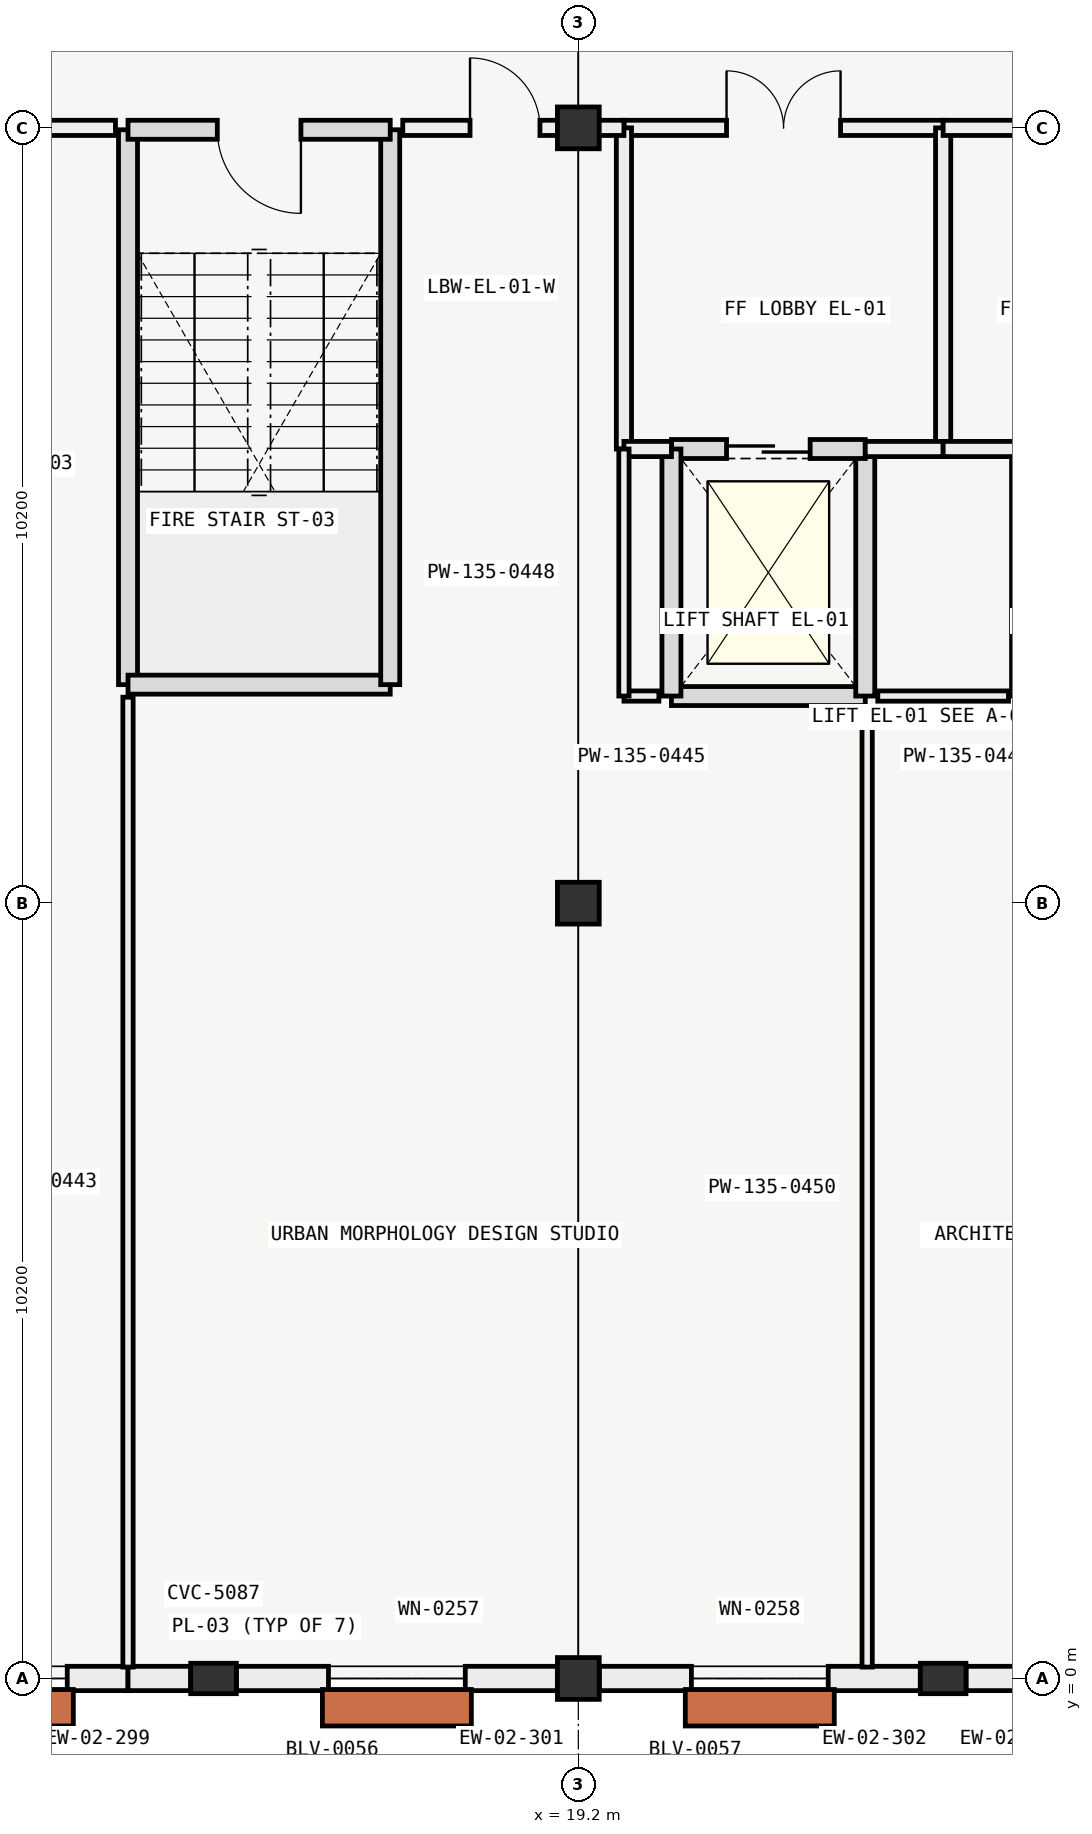
"""IFC4 building model, lengths in metres.
Left out: names, types, materials, properties, quantities, classifications, styles, units other than length and angle.
Written with IfcOpenShell. Run it as: python <this file> out.ifc"""

import sys

from ifc_helpers import new_model, si_unit, direction, frame, frame_2d, origin, origin_2d, place, context, subcontext, project, spatial, rectangle, extrude, element, fill, save


model = new_model("IFC4")
c1 = context("Model", 3, precision=1e-05, world=origin(), true_north=direction((0.0, 1.0)))
c2 = subcontext(c1, "Body", "Model", "MODEL_VIEW")
j1 = project(units=[si_unit("LENGTHUNIT", "METRE"), si_unit("PLANEANGLEUNIT", "RADIAN")], contexts=[c1])
p1 = place(None, origin())
s1 = spatial("IfcSite", under=j1, at=p1, CompositionType="ELEMENT")
p2 = place(p1, origin())
s2 = spatial("IfcBuilding", under=s1, at=p2, CompositionType="ELEMENT")
p3 = place(p2, frame((0.0, 0.0, 22.2)))
s3 = spatial("IfcBuildingStorey", under=s2, at=p3, CompositionType="ELEMENT", Elevation=22.2)
for number, where, z_axis, x_axis in (
    (1, (19.2, 0.0, 0.0), (0.0, 0.0, 1.0), (1.0, 0.0, 0.0)),
    (2, (19.2, 10.2, 0.0), (0.0, 0.0, 1.0), (1.0, 0.0, 0.0)),
    (3, (19.2, 20.4, 0.0), (0.0, 0.0, 1.0), (1.0, 0.0, 0.0)),
):
    element("IfcColumn", number, at=place(p3, frame(where, z_axis=z_axis, x_axis=x_axis)), inside=s3, PredefinedType="COLUMN", context=c2, shape_type="SweptSolid", body=[
        extrude(rectangle(XDim=0.55, YDim=0.55, at=origin_2d()), origin(), (0.0, 0.0, 1.0), 4.2),
    ])
for number, where, z_axis, x_axis in (
    (4, (14.4, 0.0, 0.0), (0.0, 0.0, 1.0), (0.0, 1.0, 0.0)),
    (5, (24.0, 0.0, 0.0), (0.0, 0.0, 1.0), (0.0, 1.0, 0.0)),
):
    element("IfcColumn", number, at=place(p3, frame(where, z_axis=z_axis, x_axis=x_axis)), inside=s3, PredefinedType="PILASTER", context=c2, shape_type="SweptSolid", body=[
        extrude(rectangle(XDim=0.4, YDim=0.6, at=origin_2d()), origin(), (0.0, 0.0, 1.0), 4.2),
    ])
p4 = place(p3, frame((13.275, 0.0, 0.0), z_axis=(0.0, 0.0, 1.0), x_axis=(-1.0, 0.0, 0.0)))
e6 = element("IfcWall", 6, at=p4, inside=s3, PredefinedType="SOLIDWALL", context=c2, shape_type="SweptSolid", body=[
    extrude(rectangle(XDim=3.399, YDim=0.32, at=frame_2d((1.699, 0.0))), origin(), (0.0, 0.0, 1.0), 3.3),
])
p5 = place(p4, frame((0.8, 0.0, 0.8)))
e7 = element("IfcOpeningElement", 7, at=p5, cuts=e6, PredefinedType="OPENING", context=c2, shape_type="SweptSolid", body=[
    extrude(rectangle(XDim=1.8, YDim=2.1, at=frame_2d((0.9, 1.05))), frame((0.0, 0.17, 0.0), z_axis=(0.0, -1.0, 0.0), x_axis=(1.0, 0.0, 0.0)), (0.0, 0.0, 1.0), 0.34),
])
p6 = place(p3, frame((14.099, 0.0, 0.0), z_axis=(0.0, 0.0, 1.0), x_axis=(-1.0, 0.0, 0.0)))
e8 = element("IfcWall", 8, at=p6, inside=s3, PredefinedType="SOLIDWALL", context=c2, shape_type="SweptSolid", body=[
    extrude(rectangle(XDim=0.824, YDim=0.32, at=frame_2d((0.412, 0.0))), origin(), (0.0, 0.0, 1.0), 3.3),
])
p7 = place(p3, frame((18.924, 0.0, 0.0), z_axis=(0.0, 0.0, 1.0), x_axis=(-1.0, 0.0, 0.0)))
e9 = element("IfcWall", 9, at=p7, inside=s3, PredefinedType="SOLIDWALL", context=c2, shape_type="SweptSolid", body=[
    extrude(rectangle(XDim=4.223, YDim=0.32, at=frame_2d((2.112, 0.0))), origin(), (0.0, 0.0, 1.0), 3.3),
])
p8 = place(p7, frame((1.211, 0.0, 0.8)))
e10 = element("IfcOpeningElement", 10, at=p8, cuts=e9, PredefinedType="OPENING", context=c2, shape_type="SweptSolid", body=[
    extrude(rectangle(XDim=1.8, YDim=2.1, at=frame_2d((0.9, 1.05))), frame((0.0, 0.17, 0.0), z_axis=(0.0, -1.0, 0.0), x_axis=(1.0, 0.0, 0.0)), (0.0, 0.0, 1.0), 0.34),
])
p9 = place(p3, frame((23.699, 0.0, 0.0), z_axis=(0.0, 0.0, 1.0), x_axis=(-1.0, 0.0, 0.0)))
e11 = element("IfcWall", 11, at=p9, inside=s3, PredefinedType="SOLIDWALL", context=c2, shape_type="SweptSolid", body=[
    extrude(rectangle(XDim=4.223, YDim=0.32, at=frame_2d((2.111, 0.0))), origin(), (0.0, 0.0, 1.0), 3.3),
])
p10 = place(p9, frame((1.211, 0.0, 0.8)))
e12 = element("IfcOpeningElement", 12, at=p10, cuts=e11, PredefinedType="OPENING", context=c2, shape_type="SweptSolid", body=[
    extrude(rectangle(XDim=1.8, YDim=2.1, at=frame_2d((0.9, 1.05))), frame((0.0, 0.17, 0.0), z_axis=(0.0, -1.0, 0.0), x_axis=(1.0, 0.0, 0.0)), (0.0, 0.0, 1.0), 0.34),
])
p11 = place(p3, frame((28.524, 0.0, 0.0), z_axis=(0.0, 0.0, 1.0), x_axis=(-1.0, 0.0, 0.0)))
e13 = element("IfcWall", 13, at=p11, inside=s3, PredefinedType="SOLIDWALL", context=c2, shape_type="SweptSolid", body=[
    extrude(rectangle(XDim=4.223, YDim=0.32, at=frame_2d((2.111, 0.0))), origin(), (0.0, 0.0, 1.0), 3.3),
])
p12 = place(p11, frame((1.211, 0.0, 0.8)))
e14 = element("IfcOpeningElement", 14, at=p12, cuts=e13, PredefinedType="OPENING", context=c2, shape_type="SweptSolid", body=[
    extrude(rectangle(XDim=1.8, YDim=2.1, at=frame_2d((0.9, 1.05))), frame((0.0, 0.17, 0.0), z_axis=(0.0, -1.0, 0.0), x_axis=(1.0, 0.0, 0.0)), (0.0, 0.0, 1.0), 0.34),
])
p13 = place(p3, frame((13.275, 20.375, 0.0), z_axis=(0.0, 0.0, 1.0), x_axis=(0.0, -1.0, 0.0)))
e15 = element("IfcWall", 15, at=p13, inside=s3, PredefinedType="SOLIDWALL", context=c2, shape_type="SweptSolid", body=[
    extrude(rectangle(XDim=7.3, YDim=0.25, at=frame_2d((3.65, 0.0))), origin(), (0.0, 0.0, 1.0), 3.975),
])
p14 = place(p3, frame((13.275, 13.075, 0.0), z_axis=(0.0, 0.0, 1.0), x_axis=(1.0, 0.0, 0.0)))
e16 = element("IfcWall", 16, at=p14, inside=s3, PredefinedType="SOLIDWALL", context=c2, shape_type="SweptSolid", body=[
    extrude(rectangle(XDim=3.45, YDim=0.25, at=frame_2d((1.725, 0.0))), origin(), (0.0, 0.0, 1.0), 3.975),
])
p15 = place(p3, frame((16.725, 13.075, 0.0), z_axis=(0.0, 0.0, 1.0), x_axis=(0.0, 1.0, 0.0)))
e17 = element("IfcWall", 17, at=p15, inside=s3, PredefinedType="SOLIDWALL", context=c2, shape_type="SweptSolid", body=[
    extrude(rectangle(XDim=7.3, YDim=0.25, at=frame_2d((3.65, 0.0))), origin(), (0.0, 0.0, 1.0), 3.975),
])
p16 = place(p3, frame((16.725, 20.375, 0.0), z_axis=(0.0, 0.0, 1.0), x_axis=(-1.0, 0.0, 0.0)))
e18 = element("IfcWall", 18, at=p16, inside=s3, PredefinedType="SOLIDWALL", context=c2, shape_type="SweptSolid", body=[
    extrude(rectangle(XDim=3.45, YDim=0.25, at=frame_2d((1.725, 0.0))), origin(), (0.0, 0.0, 1.0), 3.975),
])
p17 = place(p16, frame((1.175, 0.0, 0.0)))
e19 = element("IfcOpeningElement", 19, at=p17, cuts=e18, PredefinedType="OPENING", context=c2, shape_type="SweptSolid", body=[
    extrude(rectangle(XDim=1.1, YDim=2.2, at=frame_2d((0.55, 1.1))), frame((0.0, 0.135, 0.0), z_axis=(0.0, -1.0, 0.0), x_axis=(1.0, 0.0, 0.0)), (0.0, 0.0, 1.0), 0.27),
])
p18 = place(p3, frame((20.425, 12.925, 0.0), z_axis=(0.0, 0.0, 1.0), x_axis=(1.0, 0.0, 0.0)))
e20 = element("IfcWall", 20, at=p18, inside=s3, PredefinedType="SOLIDWALL", context=c2, shape_type="SweptSolid", body=[
    extrude(rectangle(XDim=2.55, YDim=0.25, at=frame_2d((1.275, 0.0))), origin(), (0.0, 0.0, 1.0), 3.975),
])
p19 = place(p3, frame((22.975, 12.925, 0.0), z_axis=(0.0, 0.0, 1.0), x_axis=(0.0, 1.0, 0.0)))
e21 = element("IfcWall", 21, at=p19, inside=s3, PredefinedType="SOLIDWALL", context=c2, shape_type="SweptSolid", body=[
    extrude(rectangle(XDim=3.25, YDim=0.25, at=frame_2d((1.625, 0.0))), origin(), (0.0, 0.0, 1.0), 3.975),
])
p20 = place(p3, frame((22.975, 16.175, 0.0), z_axis=(0.0, 0.0, 1.0), x_axis=(-1.0, 0.0, 0.0)))
e22 = element("IfcWall", 22, at=p20, inside=s3, PredefinedType="SOLIDWALL", context=c2, shape_type="SweptSolid", body=[
    extrude(rectangle(XDim=2.55, YDim=0.25, at=frame_2d((1.275, 0.0))), origin(), (0.0, 0.0, 1.0), 3.975),
])
p21 = place(p20, frame((0.725, 0.0, 0.0)))
e23 = element("IfcOpeningElement", 23, at=p21, cuts=e22, PredefinedType="OPENING", context=c2, shape_type="SweptSolid", body=[
    extrude(rectangle(XDim=1.1, YDim=2.1, at=frame_2d((0.55, 1.05))), frame((0.0, 0.135, 0.0), z_axis=(0.0, -1.0, 0.0), x_axis=(1.0, 0.0, 0.0)), (0.0, 0.0, 1.0), 0.27),
])
p22 = place(p3, frame((20.425, 16.175, 0.0), z_axis=(0.0, 0.0, 1.0), x_axis=(0.0, -1.0, 0.0)))
e24 = element("IfcWall", 24, at=p22, inside=s3, PredefinedType="SOLIDWALL", context=c2, shape_type="SweptSolid", body=[
    extrude(rectangle(XDim=3.25, YDim=0.25, at=frame_2d((1.625, 0.0))), origin(), (0.0, 0.0, 1.0), 3.975),
])
p23 = place(p3, frame((19.8, 20.4, 0.0), z_axis=(0.0, 0.0, 1.0), x_axis=(1.0, 0.0, 0.0)))
e25 = element("IfcWall", 25, at=p23, inside=s3, PredefinedType="PARTITIONING", context=c2, shape_type="SweptSolid", body=[
    extrude(rectangle(XDim=4.2, YDim=0.2, at=frame_2d((2.1, 0.0))), origin(), (0.0, 0.0, 1.0), 3.405),
])
p24 = place(p23, frame((1.35, 0.0, 0.0)))
e26 = element("IfcOpeningElement", 26, at=p24, cuts=e25, PredefinedType="OPENING", context=c2, shape_type="SweptSolid", body=[
    extrude(rectangle(XDim=1.5, YDim=2.2, at=frame_2d((0.75, 1.1))), frame((0.0, 0.11, 0.0), z_axis=(0.0, -1.0, 0.0), x_axis=(1.0, 0.0, 0.0)), (0.0, 0.0, 1.0), 0.22),
])
for number, where, z_axis, x_axis in (
    (27, (19.8, 16.175, 0.0), (0.0, 0.0, 1.0), (0.0, 1.0, 0.0)),
    (28, (24.0, 16.175, 0.0), (0.0, 0.0, 1.0), (0.0, 1.0, 0.0)),
):
    element("IfcWall", number, at=place(p3, frame(where, z_axis=z_axis, x_axis=x_axis)), inside=s3, PredefinedType="PARTITIONING", context=c2, shape_type="SweptSolid", body=[
        extrude(rectangle(XDim=4.225, YDim=0.2, at=frame_2d((2.112, 0.0))), origin(), (0.0, 0.0, 1.0), 3.405),
    ])
p25 = place(p3, frame((19.8, 16.175, 0.0), z_axis=(0.0, 0.0, 1.0), x_axis=(1.0, 0.0, 0.0)))
e29 = element("IfcWall", 29, at=p25, inside=s3, PredefinedType="PARTITIONING", context=c2, shape_type="SweptSolid", body=[
    extrude(rectangle(XDim=0.625, YDim=0.2, at=frame_2d((0.312, 0.0))), origin(), (0.0, 0.0, 1.0), 3.55),
])
p26 = place(p3, frame((22.975, 16.175, 0.0), z_axis=(0.0, 0.0, 1.0), x_axis=(1.0, 0.0, 0.0)))
e30 = element("IfcWall", 30, at=p26, inside=s3, PredefinedType="PARTITIONING", context=c2, shape_type="SweptSolid", body=[
    extrude(rectangle(XDim=1.025, YDim=0.2, at=frame_2d((0.512, 0.0))), origin(), (0.0, 0.0, 1.0), 3.55),
])
p27 = place(p3, frame((24.0, 20.4, 0.0), z_axis=(0.0, 0.0, 1.0), x_axis=(1.0, 0.0, 0.0)))
e31 = element("IfcWall", 31, at=p27, inside=s3, PredefinedType="PARTITIONING", context=c2, shape_type="SweptSolid", body=[
    extrude(rectangle(XDim=4.2, YDim=0.2, at=frame_2d((2.1, 0.0))), origin(), (0.0, 0.0, 1.0), 3.405),
])
p28 = place(p27, frame((1.35, 0.0, 0.0)))
e32 = element("IfcOpeningElement", 32, at=p28, cuts=e31, PredefinedType="OPENING", context=c2, shape_type="SweptSolid", body=[
    extrude(rectangle(XDim=1.5, YDim=2.2, at=frame_2d((0.75, 1.1))), frame((0.0, 0.11, 0.0), z_axis=(0.0, -1.0, 0.0), x_axis=(1.0, 0.0, 0.0)), (0.0, 0.0, 1.0), 0.22),
])
p29 = place(p3, frame((24.0, 16.175, 0.0), z_axis=(0.0, 0.0, 1.0), x_axis=(1.0, 0.0, 0.0)))
e33 = element("IfcWall", 33, at=p29, inside=s3, PredefinedType="PARTITIONING", context=c2, shape_type="SweptSolid", body=[
    extrude(rectangle(XDim=1.025, YDim=0.2, at=frame_2d((0.512, 0.0))), origin(), (0.0, 0.0, 1.0), 3.55),
])
p30 = place(p3, frame((13.275, 0.15, 0.0), z_axis=(0.0, 0.0, 1.0), x_axis=(0.0, 1.0, 0.0)))
e34 = element("IfcWall", 34, at=p30, inside=s3, PredefinedType="PARTITIONING", context=c2, shape_type="SweptSolid", body=[
    extrude(rectangle(XDim=12.76, YDim=0.135, at=frame_2d((6.38, 0.0))), origin(), (0.0, 0.0, 1.0), 3.405),
])
p31 = place(p3, frame((0.15, 20.4, 0.0), z_axis=(0.0, 0.0, 1.0), x_axis=(1.0, 0.0, 0.0)))
e35 = element("IfcWall", 35, at=p31, inside=s3, PredefinedType="PARTITIONING", context=c2, shape_type="SweptSolid", body=[
    extrude(rectangle(XDim=12.96, YDim=0.2, at=frame_2d((6.48, 0.0))), origin(), (0.0, 0.0, 1.0), 3.305),
])
p32 = place(p31, frame((6.05, 0.0, 0.0)))
e36 = element("IfcOpeningElement", 36, at=p32, cuts=e35, PredefinedType="OPENING", context=c2, shape_type="SweptSolid", body=[
    extrude(rectangle(XDim=1.6, YDim=2.25, at=frame_2d((0.8, 1.125))), frame((0.0, 0.11, 0.0), z_axis=(0.0, -1.0, 0.0), x_axis=(1.0, 0.0, 0.0)), (0.0, 0.0, 1.0), 0.22),
])
p33 = place(p3, frame((19.8, 12.925, 0.0), z_axis=(0.0, 0.0, 1.0), x_axis=(1.0, 0.0, 0.0)))
e37 = element("IfcWall", 37, at=p33, inside=s3, PredefinedType="PARTITIONING", context=c2, shape_type="SweptSolid", body=[
    extrude(rectangle(XDim=0.46, YDim=0.135, at=frame_2d((0.23, 0.0))), origin(), (0.0, 0.0, 1.0), 3.85),
])
p34 = place(p3, frame((23.14, 12.925, 0.0), z_axis=(0.0, 0.0, 1.0), x_axis=(1.0, 0.0, 0.0)))
e38 = element("IfcWall", 38, at=p34, inside=s3, PredefinedType="PARTITIONING", context=c2, shape_type="SweptSolid", body=[
    extrude(rectangle(XDim=1.72, YDim=0.135, at=frame_2d((0.86, 0.0))), origin(), (0.0, 0.0, 1.0), 3.85),
])
p35 = place(p3, frame((19.8, 12.925, 0.0), z_axis=(0.0, 0.0, 1.0), x_axis=(0.0, 1.0, 0.0)))
e39 = element("IfcWall", 39, at=p35, inside=s3, PredefinedType="PARTITIONING", context=c2, shape_type="SweptSolid", body=[
    extrude(rectangle(XDim=3.25, YDim=0.135, at=frame_2d((1.625, 0.0))), origin(), (0.0, 0.0, 1.0), 3.85),
])
p36 = place(p3, frame((16.89, 20.4, 0.0), z_axis=(0.0, 0.0, 1.0), x_axis=(1.0, 0.0, 0.0)))
e40 = element("IfcWall", 40, at=p36, inside=s3, PredefinedType="PARTITIONING", context=c2, shape_type="SweptSolid", body=[
    extrude(rectangle(XDim=2.91, YDim=0.2, at=frame_2d((1.455, 0.0))), origin(), (0.0, 0.0, 1.0), 3.305),
])
p37 = place(p36, frame((0.885, 0.0, 0.0)))
e41 = element("IfcOpeningElement", 41, at=p37, cuts=e40, PredefinedType="OPENING", context=c2, shape_type="SweptSolid", body=[
    extrude(rectangle(XDim=0.92, YDim=2.1, at=frame_2d((0.46, 1.05))), frame((0.0, 0.11, 0.0), z_axis=(0.0, -1.0, 0.0), x_axis=(1.0, 0.0, 0.0)), (0.0, 0.0, 1.0), 0.22),
])
p38 = place(p3, frame((23.0, 0.15, 0.0), z_axis=(0.0, 0.0, 1.0), x_axis=(0.0, 1.0, 0.0)))
e42 = element("IfcWall", 42, at=p38, inside=s3, PredefinedType="PARTITIONING", context=c2, shape_type="SweptSolid", body=[
    extrude(rectangle(XDim=12.61, YDim=0.135, at=frame_2d((6.305, 0.0))), origin(), (0.0, 0.0, 1.0), 3.405),
])
p39 = place(p5, origin())
e43 = element("IfcWindow", 43, at=p39, inside=s3, PartitioningType="SINGLE_PANEL", PredefinedType="WINDOW", context=c2, shape_type="SweptSolid", body=[
    extrude(rectangle(XDim=1.8, YDim=2.1, at=frame_2d((0.9, 1.05))), frame((0.0, 0.03, 0.0), z_axis=(0.0, -1.0, 0.0), x_axis=(1.0, 0.0, 0.0)), (0.0, 0.0, 1.0), 0.06),
])
fill(e7, e43)
p40 = place(p8, origin())
e44 = element("IfcWindow", 44, at=p40, inside=s3, PartitioningType="SINGLE_PANEL", PredefinedType="WINDOW", context=c2, shape_type="SweptSolid", body=[
    extrude(rectangle(XDim=1.8, YDim=2.1, at=frame_2d((0.9, 1.05))), frame((0.0, 0.03, 0.0), z_axis=(0.0, -1.0, 0.0), x_axis=(1.0, 0.0, 0.0)), (0.0, 0.0, 1.0), 0.06),
])
fill(e10, e44)
p41 = place(p10, origin())
e45 = element("IfcWindow", 45, at=p41, inside=s3, PartitioningType="SINGLE_PANEL", PredefinedType="WINDOW", context=c2, shape_type="SweptSolid", body=[
    extrude(rectangle(XDim=1.8, YDim=2.1, at=frame_2d((0.9, 1.05))), frame((0.0, 0.03, 0.0), z_axis=(0.0, -1.0, 0.0), x_axis=(1.0, 0.0, 0.0)), (0.0, 0.0, 1.0), 0.06),
])
fill(e12, e45)
p42 = place(p17, origin())
e46 = element("IfcDoor", 46, at=p42, inside=s3, OperationType="SINGLE_SWING_LEFT", PredefinedType="DOOR", context=c2, shape_type="SweptSolid", body=[
    extrude(rectangle(XDim=1.1, YDim=2.2, at=frame_2d((0.55, 1.1))), frame((0.0, 0.025, 0.0), z_axis=(0.0, -1.0, 0.0), x_axis=(1.0, 0.0, 0.0)), (0.0, 0.0, 1.0), 0.05),
])
fill(e19, e46)
p43 = place(p21, origin())
e47 = element("IfcDoor", 47, at=p43, inside=s3, OperationType="SLIDING_TO_LEFT", PredefinedType="DOOR", context=c2, shape_type="SweptSolid", body=[
    extrude(rectangle(XDim=1.1, YDim=2.1, at=frame_2d((0.55, 1.05))), frame((0.0, 0.025, 0.0), z_axis=(0.0, -1.0, 0.0), x_axis=(1.0, 0.0, 0.0)), (0.0, 0.0, 1.0), 0.05),
])
fill(e23, e47)
p44 = place(p24, origin())
e48 = element("IfcDoor", 48, at=p44, inside=s3, OperationType="SINGLE_SWING_LEFT", PredefinedType="DOOR", context=c2, shape_type="SweptSolid", body=[
    extrude(rectangle(XDim=1.5, YDim=2.2, at=frame_2d((0.75, 1.1))), frame((0.0, 0.025, 0.0), z_axis=(0.0, -1.0, 0.0), x_axis=(1.0, 0.0, 0.0)), (0.0, 0.0, 1.0), 0.05),
])
fill(e26, e48)
p45 = place(p37, origin())
e49 = element("IfcDoor", 49, at=p45, inside=s3, OperationType="SINGLE_SWING_LEFT", PredefinedType="DOOR", context=c2, shape_type="SweptSolid", body=[
    extrude(rectangle(XDim=0.92, YDim=2.1, at=frame_2d((0.46, 1.05))), frame((0.0, 0.025, 0.0), z_axis=(0.0, -1.0, 0.0), x_axis=(1.0, 0.0, 0.0)), (0.0, 0.0, 1.0), 0.05),
])
fill(e41, e49)
save(model, sys.argv[1])
